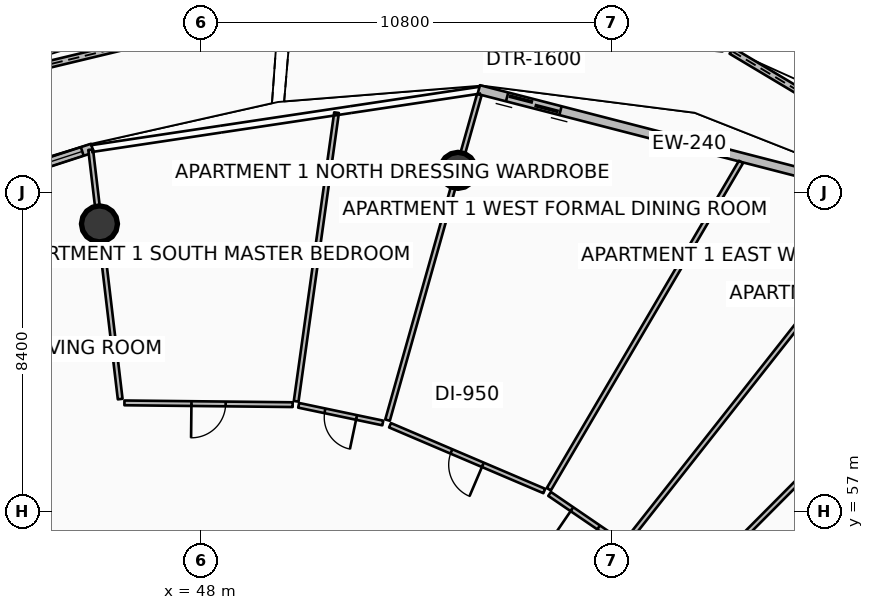
"""IFC4 building model, lengths in metres.
Left out: names, types, materials, properties, quantities, classifications, styles, units other than length and angle.
Written with IfcOpenShell. Run it as: python <this file> out.ifc"""

import sys

from ifc_helpers import new_model, si_unit, direction, frame, frame_2d, origin, origin_2d, place, context, subcontext, project, spatial, polyline, rectangle, circle, outline, extrude, element, fill, save


model = new_model("IFC4")
c1 = context("Model", 3, precision=1e-05, world=origin(), true_north=direction((0.0, 1.0)))
c2 = subcontext(c1, "Body", "Model", "MODEL_VIEW")
j1 = project(units=[si_unit("LENGTHUNIT", "METRE"), si_unit("PLANEANGLEUNIT", "RADIAN")], contexts=[c1])
p1 = place(None, origin())
s1 = spatial("IfcSite", under=j1, at=p1, CompositionType="ELEMENT")
p2 = place(p1, origin())
s2 = spatial("IfcBuilding", under=s1, at=p2, CompositionType="ELEMENT")
p3 = place(p2, frame((0.0, 0.0, 248.25)))
s3 = spatial("IfcBuildingStorey", under=s2, at=p3, CompositionType="ELEMENT", Elevation=248.25)
for number, where, z_axis, x_axis in (
    (1, (54.763, 65.979, 0.0), (0.0, 0.0, 1.0), (1.0, 0.0, 0.0)),
    (2, (45.329, 64.571, 0.0), (0.0, 0.0, 1.0), (1.0, 0.0, 0.0)),
):
    element("IfcColumn", number, at=place(p3, frame(where, z_axis=z_axis, x_axis=x_axis)), inside=s3, PredefinedType="COLUMN", context=c2, shape_type="SweptSolid", body=[
        extrude(circle(Radius=0.475, at=origin_2d()), origin(), (0.0, 0.0, 1.0), 3.59),
    ])
p4 = place(p3, frame((72.251, 62.97, 0.0), z_axis=(0.0, 0.0, 1.0), x_axis=(-0.858273121585, 0.513193188541, 0.0)))
e3 = element("IfcWall", 3, at=p4, inside=s3, PredefinedType="PARAPET", context=c2, shape_type="SweptSolid", body=[
    extrude(outline(polyline([(0.0, 0.0), (11.996, 0.0), (11.995, 1.348), (5.998, 1.182), (0.0, 1.12), (0.0, 0.0)])), frame((0.0, 0.09, 0.0), z_axis=(0.0, -1.0, 0.0), x_axis=(1.0, 0.0, 0.0)), (0.0, 0.0, 1.0), 0.18),
])
p5 = place(p3, frame((50.048, 70.219, 0.0), z_axis=(0.0, 0.0, 1.0), x_axis=(-0.972325059784, -0.233632142729, 0.0)))
e4 = element("IfcWall", 4, at=p5, inside=s3, PredefinedType="PARAPET", context=c2, shape_type="SweptSolid", body=[
    extrude(outline(polyline([(0.0, 0.0), (10.58, 0.0), (10.58, 1.832), (5.29, 1.853), (0.0, 1.756), (0.0, 0.0)])), frame((0.0, 0.09, 0.0), z_axis=(0.0, -1.0, 0.0), x_axis=(1.0, 0.0, 0.0)), (0.0, 0.0, 1.0), 0.18),
])
p6 = place(p3, frame((66.386, 65.249, 0.0), z_axis=(0.0, 0.0, 1.0), x_axis=(-0.968343758421, 0.249620442927, 0.0)))
e5 = element("IfcWall", 5, at=p6, inside=s3, PredefinedType="SOLIDWALL", context=c2, shape_type="SweptSolid", body=[
    extrude(rectangle(XDim=11.438, YDim=0.24, at=frame_2d((5.719, 0.0))), origin(), (0.0, 0.0, 1.0), 2.54),
])
p7 = place(p6, frame((9.218, 0.0, 0.0)))
e6 = element("IfcOpeningElement", 6, at=p7, cuts=e5, PredefinedType="OPENING", context=c2, shape_type="SweptSolid", body=[
    extrude(rectangle(XDim=1.45, YDim=2.15, at=frame_2d((0.725, 1.075))), frame((0.0, 0.13, 0.0), z_axis=(0.0, -1.0, 0.0), x_axis=(1.0, 0.0, 0.0)), (0.0, 0.0, 1.0), 0.26),
])
p8 = place(p6, frame((0.28, 0.0, 0.65)))
e7 = element("IfcOpeningElement", 7, at=p8, cuts=e5, PredefinedType="OPENING", context=c2, shape_type="SweptSolid", body=[
    extrude(rectangle(XDim=1.6, YDim=1.5, at=frame_2d((0.8, 0.75))), frame((0.0, 0.13, 0.0), z_axis=(0.0, -1.0, 0.0), x_axis=(1.0, 0.0, 0.0)), (0.0, 0.0, 1.0), 0.26),
])
p9 = place(p3, frame((45.142, 66.564, 0.0), z_axis=(0.0, 0.0, 1.0), x_axis=(-0.951055974609, -0.309018661507, 0.0)))
e8 = element("IfcWall", 8, at=p9, inside=s3, PredefinedType="SOLIDWALL", context=c2, shape_type="SweptSolid", body=[
    extrude(rectangle(XDim=9.745, YDim=0.24, at=frame_2d((4.873, 0.0))), origin(), (0.0, 0.0, 1.0), 2.54),
])
p10 = place(p9, frame((7.525, 0.0, 0.0)))
e9 = element("IfcOpeningElement", 9, at=p10, cuts=e8, PredefinedType="OPENING", context=c2, shape_type="SweptSolid", body=[
    extrude(rectangle(XDim=1.45, YDim=2.15, at=frame_2d((0.725, 1.075))), frame((0.0, 0.13, 0.0), z_axis=(0.0, -1.0, 0.0), x_axis=(1.0, 0.0, 0.0)), (0.0, 0.0, 1.0), 0.26),
])
p11 = place(p9, frame((0.28, 0.0, 0.65)))
e10 = element("IfcOpeningElement", 10, at=p11, cuts=e8, PredefinedType="OPENING", context=c2, shape_type="SweptSolid", body=[
    extrude(rectangle(XDim=1.6, YDim=1.5, at=frame_2d((0.8, 0.75))), frame((0.0, 0.13, 0.0), z_axis=(0.0, -1.0, 0.0), x_axis=(1.0, 0.0, 0.0)), (0.0, 0.0, 1.0), 0.26),
])
p12 = place(p3, frame((59.796, 48.606, 0.0), z_axis=(0.0, 0.0, 1.0), x_axis=(0.872493213488, 0.488626229767, 0.0)))
e11 = element("IfcWall", 11, at=p12, inside=s3, PredefinedType="PARTITIONING", context=c2, shape_type="SweptSolid", body=[
    extrude(rectangle(XDim=16.91, YDim=0.18, at=frame_2d((8.455, 0.0))), origin(), (0.0, 0.0, 1.0), 2.957),
])
p13 = place(p3, frame((60.749, 54.815, 0.0), z_axis=(0.0, 0.0, 1.0), x_axis=(0.705267705861, 0.708941085753, 0.0)))
e12 = element("IfcWall", 12, at=p13, inside=s3, PredefinedType="PARTITIONING", context=c2, shape_type="SweptSolid", body=[
    extrude(rectangle(XDim=11.498, YDim=0.125, at=frame_2d((5.749, 0.0))), origin(), (0.0, 0.0, 1.0), 3.03),
])
p14 = place(p3, frame((59.198, 56.204, 0.0), z_axis=(0.0, 0.0, 1.0), x_axis=(0.619101452742, 0.785311015593, 0.0)))
e13 = element("IfcWall", 13, at=p14, inside=s3, PredefinedType="PARTITIONING", context=c2, shape_type="SweptSolid", body=[
    extrude(rectangle(XDim=11.509, YDim=0.125, at=frame_2d((5.754, 0.0))), origin(), (0.0, 0.0, 1.0), 2.957),
])
p15 = place(p3, frame((57.153, 57.588, 0.0), z_axis=(0.0, 0.0, 1.0), x_axis=(0.506323477253, 0.862343630105, 0.0)))
e14 = element("IfcWall", 14, at=p15, inside=s3, PredefinedType="PARTITIONING", context=c2, shape_type="SweptSolid", body=[
    extrude(rectangle(XDim=9.988, YDim=0.125, at=frame_2d((4.994, 0.0))), origin(), (0.0, 0.0, 1.0), 3.03),
])
p16 = place(p3, frame((59.053, 56.182, 0.0), z_axis=(0.0, 0.0, 1.0), x_axis=(-0.825709590898, 0.56409544538, 0.0)))
e15 = element("IfcWall", 15, at=p16, inside=s3, PredefinedType="PARTITIONING", context=c2, shape_type="SweptSolid", body=[
    extrude(rectangle(XDim=2.276, YDim=0.125, at=frame_2d((1.138, 0.0))), origin(), (0.0, 0.0, 1.0), 2.957),
])
p17 = place(p16, frame((0.713, 0.0, 0.0)))
e16 = element("IfcOpeningElement", 16, at=p17, cuts=e15, PredefinedType="OPENING", context=c2, shape_type="SweptSolid", body=[
    extrude(rectangle(XDim=0.85, YDim=2.06, at=frame_2d((0.425, 1.03))), frame((0.0, 0.073, 0.0), z_axis=(0.0, -1.0, 0.0), x_axis=(1.0, 0.0, 0.0)), (0.0, 0.0, 1.0), 0.145),
])
p18 = place(p3, frame((57.034, 57.542, 0.0), z_axis=(0.0, 0.0, 1.0), x_axis=(-0.919921628857, 0.392102278445, 0.0)))
e17 = element("IfcWall", 17, at=p18, inside=s3, PredefinedType="PARTITIONING", context=c2, shape_type="SweptSolid", body=[
    extrude(rectangle(XDim=4.413, YDim=0.125, at=frame_2d((2.206, 0.0))), origin(), (0.0, 0.0, 1.0), 2.957),
])
p19 = place(p18, frame((1.756, 0.0, 0.0)))
e18 = element("IfcOpeningElement", 18, at=p19, cuts=e17, PredefinedType="OPENING", context=c2, shape_type="SweptSolid", body=[
    extrude(rectangle(XDim=0.9, YDim=2.08, at=frame_2d((0.45, 1.04))), frame((0.0, 0.073, 0.0), z_axis=(0.0, -1.0, 0.0), x_axis=(1.0, 0.0, 0.0)), (0.0, 0.0, 1.0), 0.145),
])
p20 = place(p3, frame((52.909, 59.408, 0.0), z_axis=(0.0, 0.0, 1.0), x_axis=(0.271454299549, 0.962451330331, 0.0)))
e19 = element("IfcWall", 19, at=p20, inside=s3, PredefinedType="PARTITIONING", context=c2, shape_type="SweptSolid", body=[
    extrude(rectangle(XDim=8.897, YDim=0.125, at=frame_2d((4.449, 0.0))), origin(), (0.0, 0.0, 1.0), 2.957),
])
p21 = place(p3, frame((45.874, 59.962, 0.0), z_axis=(0.0, 0.0, 1.0), x_axis=(-0.117533659592, 0.993068899353, 0.0)))
e20 = element("IfcWall", 20, at=p21, inside=s3, PredefinedType="PARTITIONING", context=c2, shape_type="SweptSolid", body=[
    extrude(rectangle(XDim=6.608, YDim=0.125, at=frame_2d((3.304, 0.0))), origin(), (0.0, 0.0, 1.0), 2.957),
])
p22 = place(p3, frame((50.505, 59.903, 0.0), z_axis=(0.0, 0.0, 1.0), x_axis=(0.138550424847, 0.990355380545, 0.0)))
e21 = element("IfcWall", 21, at=p22, inside=s3, PredefinedType="PARTITIONING", context=c2, shape_type="SweptSolid", body=[
    extrude(rectangle(XDim=7.669, YDim=0.125, at=frame_2d((3.834, 0.0))), origin(), (0.0, 0.0, 1.0), 3.03),
])
p23 = place(p3, frame((52.784, 59.332, 0.0), z_axis=(0.0, 0.0, 1.0), x_axis=(-0.978655016217, 0.205509997891, 0.0)))
e22 = element("IfcWall", 22, at=p23, inside=s3, PredefinedType="PARTITIONING", context=c2, shape_type="SweptSolid", body=[
    extrude(rectangle(XDim=2.262, YDim=0.125, at=frame_2d((1.131, 0.0))), origin(), (0.0, 0.0, 1.0), 2.957),
])
p24 = place(p23, frame((0.706, 0.0, 0.0)))
e23 = element("IfcOpeningElement", 23, at=p24, cuts=e22, PredefinedType="OPENING", context=c2, shape_type="SweptSolid", body=[
    extrude(rectangle(XDim=0.85, YDim=2.06, at=frame_2d((0.425, 1.03))), frame((0.0, 0.073, 0.0), z_axis=(0.0, -1.0, 0.0), x_axis=(1.0, 0.0, 0.0)), (0.0, 0.0, 1.0), 0.145),
])
p25 = place(p3, frame((50.412, 59.814, 0.0), z_axis=(0.0, 0.0, 1.0), x_axis=(-0.999943934923, 0.01058900422, 0.0)))
e24 = element("IfcWall", 24, at=p25, inside=s3, PredefinedType="PARTITIONING", context=c2, shape_type="SweptSolid", body=[
    extrude(rectangle(XDim=4.427, YDim=0.125, at=frame_2d((2.213, 0.0))), origin(), (0.0, 0.0, 1.0), 3.03),
])
p26 = place(p25, frame((1.763, 0.0, 0.0)))
e25 = element("IfcOpeningElement", 25, at=p26, cuts=e24, PredefinedType="OPENING", context=c2, shape_type="SweptSolid", body=[
    extrude(rectangle(XDim=0.9, YDim=2.08, at=frame_2d((0.45, 1.04))), frame((0.0, 0.073, 0.0), z_axis=(0.0, -1.0, 0.0), x_axis=(1.0, 0.0, 0.0)), (0.0, 0.0, 1.0), 0.145),
])
p27 = place(p7, origin())
e26 = element("IfcDoor", 26, at=p27, inside=s3, OperationType="DOUBLE_DOOR_SLIDING", PredefinedType="DOOR", context=c2, shape_type="SweptSolid", body=[
    extrude(rectangle(XDim=1.45, YDim=2.15, at=frame_2d((0.725, 1.075))), frame((0.0, 0.025, 0.0), z_axis=(0.0, -1.0, 0.0), x_axis=(1.0, 0.0, 0.0)), (0.0, 0.0, 1.0), 0.05),
])
fill(e6, e26)
p28 = place(p11, origin())
e27 = element("IfcWindow", 27, at=p28, inside=s3, PartitioningType="SINGLE_PANEL", PredefinedType="WINDOW", context=c2, shape_type="SweptSolid", body=[
    extrude(rectangle(XDim=1.6, YDim=1.5, at=frame_2d((0.8, 0.75))), frame((0.0, 0.03, 0.0), z_axis=(0.0, -1.0, 0.0), x_axis=(1.0, 0.0, 0.0)), (0.0, 0.0, 1.0), 0.06),
])
fill(e10, e27)
p29 = place(p17, origin())
e28 = element("IfcDoor", 28, at=p29, inside=s3, OperationType="SINGLE_SWING_RIGHT", PredefinedType="DOOR", context=c2, shape_type="SweptSolid", body=[
    extrude(rectangle(XDim=0.85, YDim=2.06, at=frame_2d((0.425, 1.03))), frame((0.0, 0.025, 0.0), z_axis=(0.0, -1.0, 0.0), x_axis=(1.0, 0.0, 0.0)), (0.0, 0.0, 1.0), 0.05),
])
fill(e16, e28)
p30 = place(p19, origin())
e29 = element("IfcDoor", 29, at=p30, inside=s3, OperationType="SINGLE_SWING_LEFT", PredefinedType="DOOR", context=c2, shape_type="SweptSolid", body=[
    extrude(rectangle(XDim=0.9, YDim=2.08, at=frame_2d((0.45, 1.04))), frame((0.0, 0.025, 0.0), z_axis=(0.0, -1.0, 0.0), x_axis=(1.0, 0.0, 0.0)), (0.0, 0.0, 1.0), 0.05),
])
fill(e18, e29)
p31 = place(p24, origin())
e30 = element("IfcDoor", 30, at=p31, inside=s3, OperationType="SINGLE_SWING_LEFT", PredefinedType="DOOR", context=c2, shape_type="SweptSolid", body=[
    extrude(rectangle(XDim=0.85, YDim=2.06, at=frame_2d((0.425, 1.03))), frame((0.0, 0.025, 0.0), z_axis=(0.0, -1.0, 0.0), x_axis=(1.0, 0.0, 0.0)), (0.0, 0.0, 1.0), 0.05),
])
fill(e23, e30)
p32 = place(p26, origin())
e31 = element("IfcDoor", 31, at=p32, inside=s3, OperationType="SINGLE_SWING_RIGHT", PredefinedType="DOOR", context=c2, shape_type="SweptSolid", body=[
    extrude(rectangle(XDim=0.9, YDim=2.08, at=frame_2d((0.45, 1.04))), frame((0.0, 0.025, 0.0), z_axis=(0.0, -1.0, 0.0), x_axis=(1.0, 0.0, 0.0)), (0.0, 0.0, 1.0), 0.05),
])
fill(e25, e31)
save(model, sys.argv[1])
